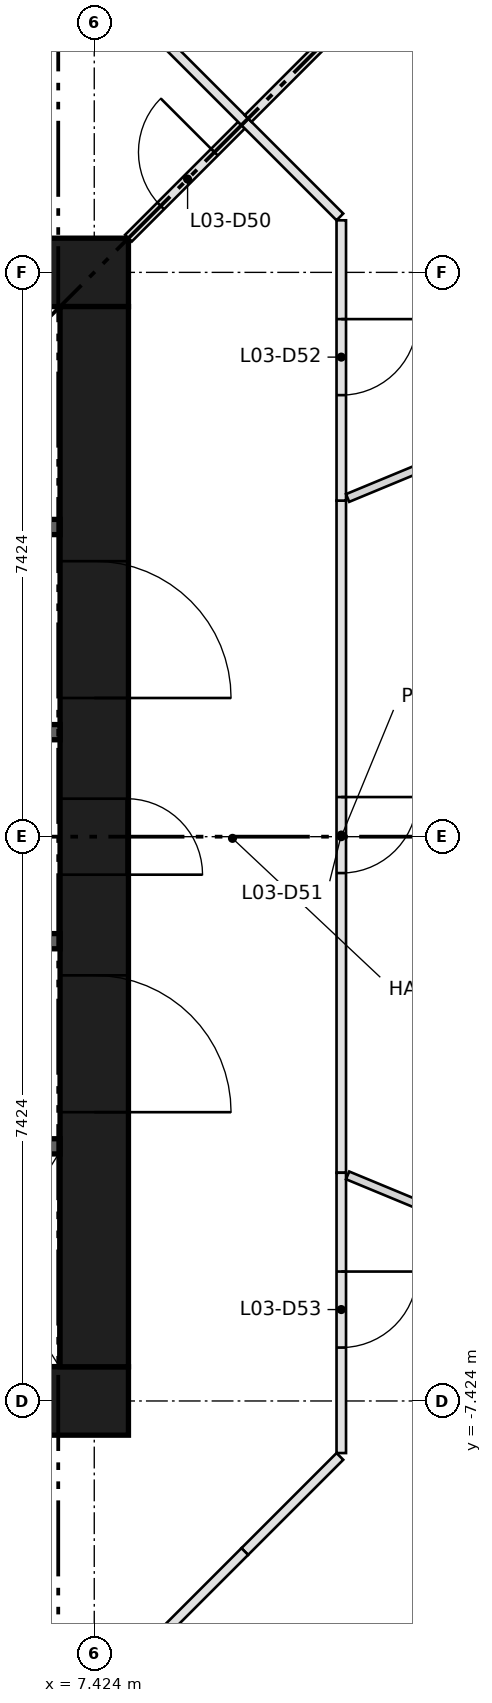
"""IFC4 building model, lengths in metres.
Left out: names, types, materials, properties, quantities, classifications, styles, units other than length and angle.
Written with IfcOpenShell. Run it as: python <this file> out.ifc"""

import sys

from ifc_helpers import new_model, si_unit, direction, frame, frame_2d, origin, place, context, subcontext, project, spatial, rectangle, extrude, element, fill, save


model = new_model("IFC4")
c1 = context("Model", 3, precision=1e-05, world=origin(), true_north=direction((0.0, 1.0)))
c2 = subcontext(c1, "Body", "Model", "MODEL_VIEW")
j1 = project(units=[si_unit("LENGTHUNIT", "METRE"), si_unit("PLANEANGLEUNIT", "RADIAN")], contexts=[c1])
p1 = place(None, origin())
s1 = spatial("IfcSite", under=j1, at=p1, CompositionType="ELEMENT")
p2 = place(p1, origin())
s2 = spatial("IfcBuilding", under=s1, at=p2, CompositionType="ELEMENT")
p3 = place(p2, frame((0.0, 0.0, 14.4)))
s3 = spatial("IfcBuildingStorey", under=s2, at=p3, CompositionType="ELEMENT", Elevation=14.4)
for number, where, z_axis, x_axis in (
    (1, (-7.874, -7.424, 0.0), (0.0, 0.0, 1.0), (1.0, 0.0, 0.0)),
    (2, (-7.874, 7.424, 0.0), (0.0, 0.0, 1.0), (1.0, 0.0, 0.0)),
):
    element("IfcWall", number, at=place(p3, frame(where, z_axis=z_axis, x_axis=x_axis)), inside=s3, PredefinedType="SHEAR", context=c2, shape_type="SweptSolid", body=[
        extrude(rectangle(XDim=15.748, YDim=0.9, at=frame_2d((7.874, 0.0))), origin(), (0.0, 0.0, 1.0), 4.1),
    ])
p4 = place(p3, frame((7.424, -6.974, 0.0), z_axis=(0.0, 0.0, 1.0), x_axis=(0.0, 1.0, 0.0)))
e3 = element("IfcWall", 3, at=p4, inside=s3, PredefinedType="SHEAR", context=c2, shape_type="SweptSolid", body=[
    extrude(rectangle(XDim=13.948, YDim=0.9, at=frame_2d((6.974, 0.0))), origin(), (0.0, 0.0, 1.0), 4.1),
])
p5 = place(p4, frame((6.474, 0.0, 0.0)))
e4 = element("IfcOpeningElement", 4, at=p5, cuts=e3, PredefinedType="OPENING", context=c2, shape_type="SweptSolid", body=[
    extrude(rectangle(XDim=1.0, YDim=2.1, at=frame_2d((0.5, 1.05))), frame((0.0, 0.46, 0.0), z_axis=(0.0, -1.0, 0.0), x_axis=(1.0, 0.0, 0.0)), (0.0, 0.0, 1.0), 0.92),
])
p6 = place(p4, frame((3.35, 0.0, 0.0)))
e5 = element("IfcOpeningElement", 5, at=p6, cuts=e3, PredefinedType="OPENING", context=c2, shape_type="SweptSolid", body=[
    extrude(rectangle(XDim=1.8, YDim=2.1, at=frame_2d((0.9, 1.05))), frame((0.0, 0.46, 0.0), z_axis=(0.0, -1.0, 0.0), x_axis=(1.0, 0.0, 0.0)), (0.0, 0.0, 1.0), 0.92),
])
p7 = place(p4, frame((8.799, 0.0, 0.0)))
e6 = element("IfcOpeningElement", 6, at=p7, cuts=e3, PredefinedType="OPENING", context=c2, shape_type="SweptSolid", body=[
    extrude(rectangle(XDim=1.8, YDim=2.1, at=frame_2d((0.9, 1.05))), frame((0.0, 0.46, 0.0), z_axis=(0.0, -1.0, 0.0), x_axis=(1.0, 0.0, 0.0)), (0.0, 0.0, 1.0), 0.92),
])
p8 = place(p3, frame((-6.974, -4.074, 0.0), z_axis=(0.0, 0.0, 1.0), x_axis=(1.0, 0.0, 0.0)))
e7 = element("IfcWall", 7, at=p8, inside=s3, PredefinedType="SHEAR", context=c2, shape_type="SweptSolid", body=[
    extrude(rectangle(XDim=13.948, YDim=0.2, at=frame_2d((6.974, 0.0))), origin(), (0.0, 0.0, 1.0), 3.7),
])
p9 = place(p8, frame((0.918, 0.0, 0.0)))
e8 = element("IfcOpeningElement", 8, at=p9, cuts=e7, PredefinedType="OPENING", context=c2, shape_type="SweptSolid", body=[
    extrude(rectangle(XDim=1.1, YDim=2.1, at=frame_2d((0.55, 1.05))), frame((0.0, 0.11, 0.0), z_axis=(0.0, -1.0, 0.0), x_axis=(1.0, 0.0, 0.0)), (0.0, 0.0, 1.0), 0.22),
])
p10 = place(p8, frame((4.055, 0.0, 0.0)))
e9 = element("IfcOpeningElement", 9, at=p10, cuts=e7, PredefinedType="OPENING", context=c2, shape_type="SweptSolid", body=[
    extrude(rectangle(XDim=1.1, YDim=2.1, at=frame_2d((0.55, 1.05))), frame((0.0, 0.11, 0.0), z_axis=(0.0, -1.0, 0.0), x_axis=(1.0, 0.0, 0.0)), (0.0, 0.0, 1.0), 0.22),
])
p11 = place(p8, frame((6.658, 0.0, 0.0)))
e10 = element("IfcOpeningElement", 10, at=p11, cuts=e7, PredefinedType="OPENING", context=c2, shape_type="SweptSolid", body=[
    extrude(rectangle(XDim=1.0, YDim=2.1, at=frame_2d((0.5, 1.05))), frame((0.0, 0.11, 0.0), z_axis=(0.0, -1.0, 0.0), x_axis=(1.0, 0.0, 0.0)), (0.0, 0.0, 1.0), 0.22),
])
p12 = place(p8, frame((8.627, 0.0, 0.0)))
e11 = element("IfcOpeningElement", 11, at=p12, cuts=e7, PredefinedType="OPENING", context=c2, shape_type="SweptSolid", body=[
    extrude(rectangle(XDim=1.0, YDim=2.1, at=frame_2d((0.5, 1.05))), frame((0.0, 0.11, 0.0), z_axis=(0.0, -1.0, 0.0), x_axis=(1.0, 0.0, 0.0)), (0.0, 0.0, 1.0), 0.22),
])
p13 = place(p8, frame((10.595, 0.0, 0.0)))
e12 = element("IfcOpeningElement", 12, at=p13, cuts=e7, PredefinedType="OPENING", context=c2, shape_type="SweptSolid", body=[
    extrude(rectangle(XDim=1.0, YDim=2.1, at=frame_2d((0.5, 1.05))), frame((0.0, 0.11, 0.0), z_axis=(0.0, -1.0, 0.0), x_axis=(1.0, 0.0, 0.0)), (0.0, 0.0, 1.0), 0.22),
])
p14 = place(p8, frame((12.564, 0.0, 0.0)))
e13 = element("IfcOpeningElement", 13, at=p14, cuts=e7, PredefinedType="OPENING", context=c2, shape_type="SweptSolid", body=[
    extrude(rectangle(XDim=1.0, YDim=2.1, at=frame_2d((0.5, 1.05))), frame((0.0, 0.11, 0.0), z_axis=(0.0, -1.0, 0.0), x_axis=(1.0, 0.0, 0.0)), (0.0, 0.0, 1.0), 0.22),
])
p15 = place(p3, frame((0.0, 4.074, 0.0), z_axis=(0.0, 0.0, 1.0), x_axis=(1.0, 0.0, 0.0)))
e14 = element("IfcWall", 14, at=p15, inside=s3, PredefinedType="SHEAR", context=c2, shape_type="SweptSolid", body=[
    extrude(rectangle(XDim=6.974, YDim=0.2, at=frame_2d((3.487, 0.0))), origin(), (0.0, 0.0, 1.0), 3.7),
])
p16 = place(p15, frame((0.179, 0.0, 0.0)))
e15 = element("IfcOpeningElement", 15, at=p16, cuts=e14, PredefinedType="OPENING", context=c2, shape_type="SweptSolid", body=[
    extrude(rectangle(XDim=0.95, YDim=2.1, at=frame_2d((0.475, 1.05))), frame((0.0, 0.11, 0.0), z_axis=(0.0, -1.0, 0.0), x_axis=(1.0, 0.0, 0.0)), (0.0, 0.0, 1.0), 0.22),
])
p17 = place(p15, frame((1.922, 0.0, 0.0)))
e16 = element("IfcOpeningElement", 16, at=p17, cuts=e14, PredefinedType="OPENING", context=c2, shape_type="SweptSolid", body=[
    extrude(rectangle(XDim=1.0, YDim=2.1, at=frame_2d((0.5, 1.05))), frame((0.0, 0.11, 0.0), z_axis=(0.0, -1.0, 0.0), x_axis=(1.0, 0.0, 0.0)), (0.0, 0.0, 1.0), 0.22),
])
p18 = place(p15, frame((3.921, 0.0, 0.0)))
e17 = element("IfcOpeningElement", 17, at=p18, cuts=e14, PredefinedType="OPENING", context=c2, shape_type="SweptSolid", body=[
    extrude(rectangle(XDim=1.0, YDim=2.1, at=frame_2d((0.5, 1.05))), frame((0.0, 0.11, 0.0), z_axis=(0.0, -1.0, 0.0), x_axis=(1.0, 0.0, 0.0)), (0.0, 0.0, 1.0), 0.22),
])
p19 = place(p15, frame((5.79, 0.0, 0.0)))
e18 = element("IfcOpeningElement", 18, at=p19, cuts=e14, PredefinedType="OPENING", context=c2, shape_type="SweptSolid", body=[
    extrude(rectangle(XDim=0.8, YDim=2.1, at=frame_2d((0.4, 1.05))), frame((0.0, 0.11, 0.0), z_axis=(0.0, -1.0, 0.0), x_axis=(1.0, 0.0, 0.0)), (0.0, 0.0, 1.0), 0.22),
])
for number, where, z_axis, x_axis in (
    (19, (4.374, -1.375, 0.0), (0.0, 0.0, 1.0), (1.0, 0.0, 0.0)),
    (20, (4.374, 1.375, 0.0), (0.0, 0.0, 1.0), (1.0, 0.0, 0.0)),
):
    element("IfcWall", number, at=place(p3, frame(where, z_axis=z_axis, x_axis=x_axis)), inside=s3, PredefinedType="SHEAR", context=c2, shape_type="SweptSolid", body=[
        extrude(rectangle(XDim=2.6, YDim=0.2, at=frame_2d((1.3, 0.0))), origin(), (0.0, 0.0, 1.0), 3.7),
    ])
p20 = place(p3, frame((7.874, 7.874, 0.0), z_axis=(0.0, 0.0, 1.0), x_axis=(0.707106781187, 0.707106781187, 0.0)))
e21 = element("IfcWall", 21, at=p20, inside=s3, PredefinedType="PARTITIONING", context=c2, shape_type="SweptSolid", body=[
    extrude(rectangle(XDim=2.102, YDim=0.125, at=frame_2d((1.051, 0.0))), origin(), (0.0, 0.0, 1.0), 3.7),
])
p21 = place(p20, frame((0.6, 0.0, 0.0)))
e22 = element("IfcOpeningElement", 22, at=p21, cuts=e21, PredefinedType="OPENING", context=c2, shape_type="SweptSolid", body=[
    extrude(rectangle(XDim=1.0, YDim=2.1, at=frame_2d((0.5, 1.05))), frame((0.0, 0.073, 0.0), z_axis=(0.0, -1.0, 0.0), x_axis=(1.0, 0.0, 0.0)), (0.0, 0.0, 1.0), 0.145),
])
p22 = place(p3, frame((10.674, 4.421, 0.0), z_axis=(0.0, 0.0, 1.0), x_axis=(0.0, -1.0, 0.0)))
e23 = element("IfcWall", 23, at=p22, inside=s3, PredefinedType="PARTITIONING", context=c2, shape_type="SweptSolid", body=[
    extrude(rectangle(XDim=8.843, YDim=0.125, at=frame_2d((4.421, 0.0))), origin(), (0.0, 0.0, 1.0), 3.7),
])
p23 = place(p22, frame((3.9, 0.0, 0.0)))
e24 = element("IfcOpeningElement", 24, at=p23, cuts=e23, PredefinedType="OPENING", context=c2, shape_type="SweptSolid", body=[
    extrude(rectangle(XDim=1.0, YDim=2.1, at=frame_2d((0.5, 1.05))), frame((0.0, 0.073, 0.0), z_axis=(0.0, -1.0, 0.0), x_axis=(1.0, 0.0, 0.0)), (0.0, 0.0, 1.0), 0.145),
])
p24 = place(p3, frame((9.405, 9.405, 0.0), z_axis=(0.0, 0.0, 1.0), x_axis=(0.707106781187, -0.707106781187, 0.0)))
e25 = element("IfcWall", 25, at=p24, inside=s3, PredefinedType="PARTITIONING", context=c2, shape_type="SweptSolid", body=[
    extrude(rectangle(XDim=1.77, YDim=0.125, at=frame_2d((0.885, 0.0))), origin(), (0.0, 0.0, 1.0), 3.7),
])
p25 = place(p3, frame((10.674, 8.109, 0.0), z_axis=(0.0, 0.0, 1.0), x_axis=(0.0, -1.0, 0.0)))
e26 = element("IfcWall", 26, at=p25, inside=s3, PredefinedType="PARTITIONING", context=c2, shape_type="SweptSolid", body=[
    extrude(rectangle(XDim=3.688, YDim=0.125, at=frame_2d((1.844, 0.0))), origin(), (0.0, 0.0, 1.0), 3.7),
])
p26 = place(p25, frame((1.3, 0.0, 0.0)))
e27 = element("IfcOpeningElement", 27, at=p26, cuts=e26, PredefinedType="OPENING", context=c2, shape_type="SweptSolid", body=[
    extrude(rectangle(XDim=1.0, YDim=2.1, at=frame_2d((0.5, 1.05))), frame((0.0, 0.073, 0.0), z_axis=(0.0, -1.0, 0.0), x_axis=(1.0, 0.0, 0.0)), (0.0, 0.0, 1.0), 0.145),
])
p27 = place(p3, frame((10.656, -8.153, 0.0), z_axis=(0.0, 0.0, 1.0), x_axis=(-0.707106781187, -0.707106781187, 0.0)))
e28 = element("IfcWall", 28, at=p27, inside=s3, PredefinedType="PARTITIONING", context=c2, shape_type="SweptSolid", body=[
    extrude(rectangle(XDim=1.77, YDim=0.125, at=frame_2d((0.885, 0.0))), origin(), (0.0, 0.0, 1.0), 3.7),
])
p28 = place(p3, frame((10.674, -4.421, 0.0), z_axis=(0.0, 0.0, 1.0), x_axis=(0.0, -1.0, 0.0)))
e29 = element("IfcWall", 29, at=p28, inside=s3, PredefinedType="PARTITIONING", context=c2, shape_type="SweptSolid", body=[
    extrude(rectangle(XDim=3.688, YDim=0.125, at=frame_2d((1.844, 0.0))), origin(), (0.0, 0.0, 1.0), 3.7),
])
p29 = place(p28, frame((1.3, 0.0, 0.0)))
e30 = element("IfcOpeningElement", 30, at=p29, cuts=e29, PredefinedType="OPENING", context=c2, shape_type="SweptSolid", body=[
    extrude(rectangle(XDim=1.0, YDim=2.1, at=frame_2d((0.5, 1.05))), frame((0.0, 0.073, 0.0), z_axis=(0.0, -1.0, 0.0), x_axis=(1.0, 0.0, 0.0)), (0.0, 0.0, 1.0), 0.145),
])
for number, where, z_axis, x_axis in (
    (31, (8.153, 10.656, 0.0), (0.0, 0.0, 1.0), (0.707, -0.707, 0.0)),
    (32, (9.405, -9.405, 0.0), (0.0, 0.0, 1.0), (-0.707, -0.707, 0.0)),
):
    element("IfcWall", number, at=place(p3, frame(where, z_axis=z_axis, x_axis=x_axis)), inside=s3, PredefinedType="PARTITIONING", context=c2, shape_type="SweptSolid", body=[
        extrude(rectangle(XDim=1.77, YDim=0.125, at=frame_2d((0.885, 0.0))), origin(), (0.0, 0.0, 1.0), 3.7),
    ])
for number, where, z_axis, x_axis in (
    (33, (10.758, 4.456, 0.0), (0.0, 0.0, 1.0), (0.924, 0.383, 0.0)),
    (34, (14.034, -5.813, 0.0), (0.0, 0.0, 1.0), (-0.924, 0.383, 0.0)),
):
    element("IfcWall", number, at=place(p3, frame(where, z_axis=z_axis, x_axis=x_axis)), inside=s3, PredefinedType="PARTITIONING", context=c2, shape_type="SweptSolid", body=[
        extrude(rectangle(XDim=3.546, YDim=0.11, at=frame_2d((1.773, 0.0))), origin(), (0.0, 0.0, 1.0), 3.7),
    ])
p30 = place(p3, frame((9.449, 9.449, 0.0), z_axis=(0.0, 0.0, 1.0), x_axis=(0.707106781187, 0.707106781187, 0.0)))
e35 = element("IfcWall", 35, at=p30, inside=s3, PredefinedType="PARTITIONING", context=c2, shape_type="SweptSolid", body=[
    extrude(rectangle(XDim=5.297, YDim=0.125, at=frame_2d((2.649, 0.0))), origin(), (0.0, 0.0, 1.0), 3.7),
])
p31 = place(p5, frame((1.0, 0.0, 0.0), z_axis=(0.0, 0.0, 1.0), x_axis=(-1.0, 0.0, 0.0)))
e36 = element("IfcDoor", 36, at=p31, inside=s3, OperationType="SINGLE_SWING_LEFT", PredefinedType="DOOR", context=c2, shape_type="SweptSolid", body=[
    extrude(rectangle(XDim=1.0, YDim=2.1, at=frame_2d((0.5, 1.05))), frame((0.0, 0.45, 0.0), z_axis=(0.0, -1.0, 0.0), x_axis=(1.0, 0.0, 0.0)), (0.0, 0.0, 1.0), 0.05),
])
fill(e4, e36)
p32 = place(p6, frame((1.8, 0.0, 0.0), z_axis=(0.0, 0.0, 1.0), x_axis=(-1.0, 0.0, 0.0)))
e37 = element("IfcDoor", 37, at=p32, inside=s3, OperationType="DOUBLE_DOOR_SINGLE_SWING", PredefinedType="DOOR", context=c2, shape_type="SweptSolid", body=[
    extrude(rectangle(XDim=1.8, YDim=2.1, at=frame_2d((0.9, 1.05))), frame((0.0, 0.025, 0.0), z_axis=(0.0, -1.0, 0.0), x_axis=(1.0, 0.0, 0.0)), (0.0, 0.0, 1.0), 0.05),
])
fill(e5, e37)
p33 = place(p7, frame((1.8, 0.0, 0.0), z_axis=(0.0, 0.0, 1.0), x_axis=(-1.0, 0.0, 0.0)))
e38 = element("IfcDoor", 38, at=p33, inside=s3, OperationType="DOUBLE_DOOR_SINGLE_SWING", PredefinedType="DOOR", context=c2, shape_type="SweptSolid", body=[
    extrude(rectangle(XDim=1.8, YDim=2.1, at=frame_2d((0.9, 1.05))), frame((0.0, 0.025, 0.0), z_axis=(0.0, -1.0, 0.0), x_axis=(1.0, 0.0, 0.0)), (0.0, 0.0, 1.0), 0.05),
])
fill(e6, e38)
p34 = place(p21, origin())
e39 = element("IfcDoor", 39, at=p34, inside=s3, OperationType="SINGLE_SWING_RIGHT", PredefinedType="DOOR", context=c2, shape_type="SweptSolid", body=[
    extrude(rectangle(XDim=1.0, YDim=2.1, at=frame_2d((0.5, 1.05))), frame((0.0, 0.025, 0.0), z_axis=(0.0, -1.0, 0.0), x_axis=(1.0, 0.0, 0.0)), (0.0, 0.0, 1.0), 0.05),
])
fill(e22, e39)
p35 = place(p23, origin())
e40 = element("IfcDoor", 40, at=p35, inside=s3, OperationType="SINGLE_SWING_LEFT", PredefinedType="DOOR", context=c2, shape_type="SweptSolid", body=[
    extrude(rectangle(XDim=1.0, YDim=2.1, at=frame_2d((0.5, 1.05))), frame((0.0, 0.025, 0.0), z_axis=(0.0, -1.0, 0.0), x_axis=(1.0, 0.0, 0.0)), (0.0, 0.0, 1.0), 0.05),
])
fill(e24, e40)
p36 = place(p26, origin())
e41 = element("IfcDoor", 41, at=p36, inside=s3, OperationType="SINGLE_SWING_LEFT", PredefinedType="DOOR", context=c2, shape_type="SweptSolid", body=[
    extrude(rectangle(XDim=1.0, YDim=2.1, at=frame_2d((0.5, 1.05))), frame((0.0, 0.025, 0.0), z_axis=(0.0, -1.0, 0.0), x_axis=(1.0, 0.0, 0.0)), (0.0, 0.0, 1.0), 0.05),
])
fill(e27, e41)
p37 = place(p29, origin())
e42 = element("IfcDoor", 42, at=p37, inside=s3, OperationType="SINGLE_SWING_LEFT", PredefinedType="DOOR", context=c2, shape_type="SweptSolid", body=[
    extrude(rectangle(XDim=1.0, YDim=2.1, at=frame_2d((0.5, 1.05))), frame((0.0, 0.025, 0.0), z_axis=(0.0, -1.0, 0.0), x_axis=(1.0, 0.0, 0.0)), (0.0, 0.0, 1.0), 0.05),
])
fill(e30, e42)
save(model, sys.argv[1])
